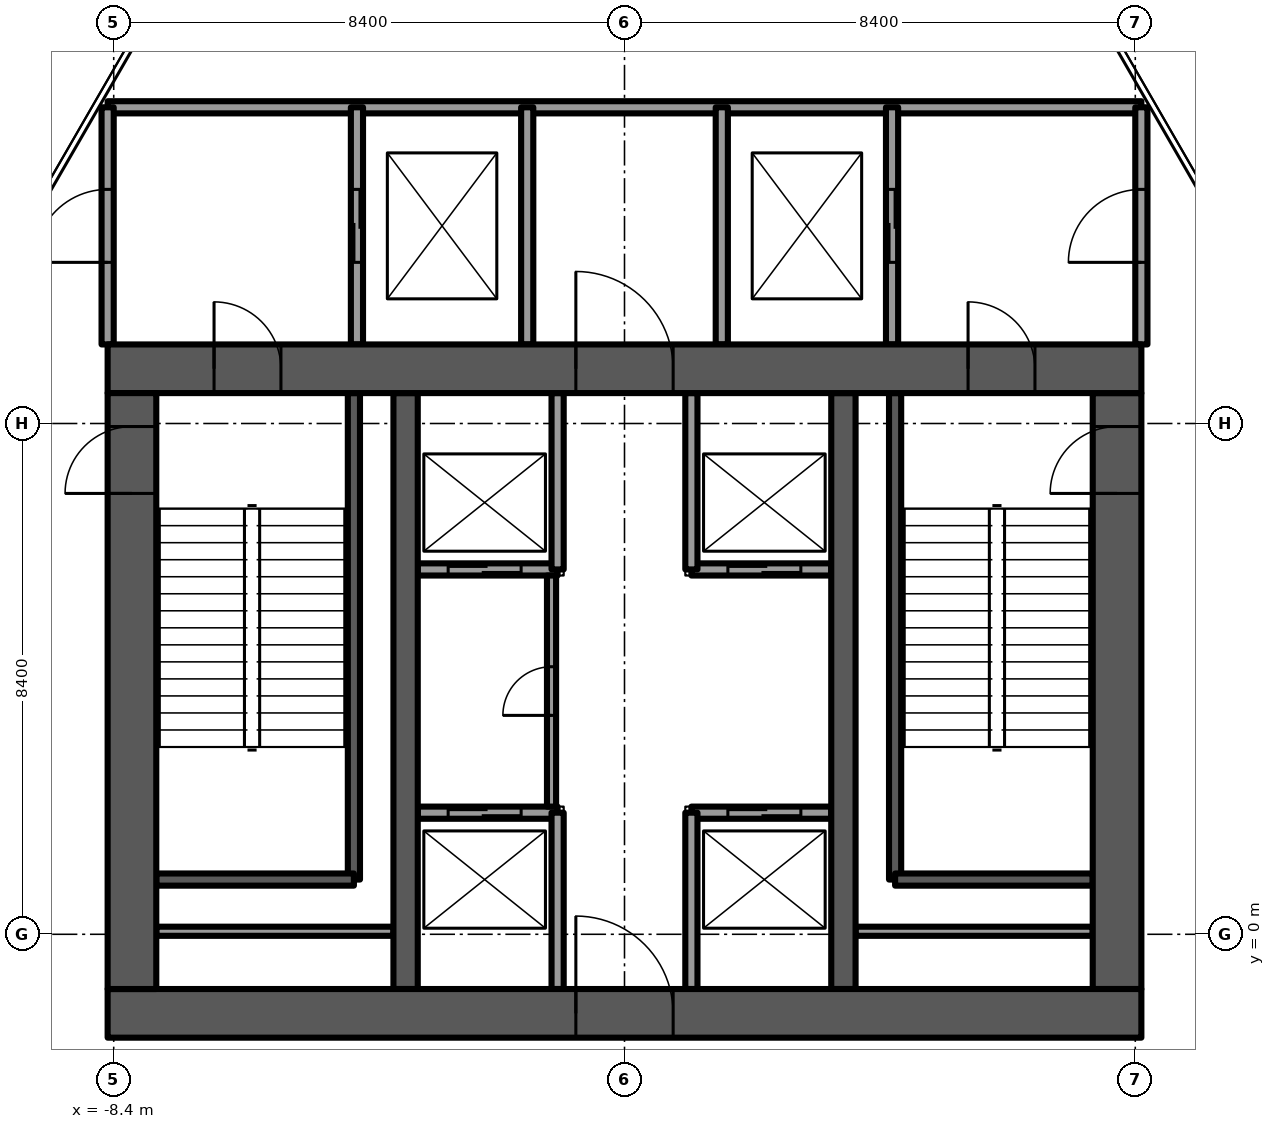
"""IFC4 building model, lengths in metres.
Left out: names, types, materials, properties, quantities, classifications, styles, units other than length and angle.
Written with IfcOpenShell. Run it as: python <this file> out.ifc"""

import sys

from ifc_helpers import new_model, si_unit, direction, frame, frame_2d, origin, place, context, subcontext, project, spatial, rectangle, extrude, element, fill, save


model = new_model("IFC4")
c1 = context("Model", 3, precision=1e-05, world=origin(), true_north=direction((0.0, 1.0)))
c2 = subcontext(c1, "Body", "Model", "MODEL_VIEW")
j1 = project(units=[si_unit("LENGTHUNIT", "METRE"), si_unit("PLANEANGLEUNIT", "RADIAN")], contexts=[c1])
p1 = place(None, origin())
s1 = spatial("IfcSite", under=j1, at=p1, CompositionType="ELEMENT")
p2 = place(p1, origin())
s2 = spatial("IfcBuilding", under=s1, at=p2, CompositionType="ELEMENT")
p3 = place(p2, frame((0.0, 0.0, 209.5)))
s3 = spatial("IfcBuildingStorey", under=s2, at=p3, CompositionType="ELEMENT", Elevation=209.5)
p4 = place(p3, frame((-8.5, -1.3, -0.3), z_axis=(0.0, 0.0, 1.0), x_axis=(1.0, 0.0, 0.0)))
e1 = element("IfcWall", 1, at=p4, inside=s3, PredefinedType="SHEAR", context=c2, shape_type="SweptSolid", body=[
    extrude(rectangle(XDim=17.0, YDim=0.8, at=frame_2d((8.5, 0.0))), origin(), (0.0, 0.0, 1.0), 5.0),
])
p5 = place(p4, frame((7.7, 0.0, 0.0)))
e2 = element("IfcOpeningElement", 2, at=p5, cuts=e1, PredefinedType="OPENING", context=c2, shape_type="SweptSolid", body=[
    extrude(rectangle(XDim=1.6, YDim=2.1, at=frame_2d((0.8, 1.05))), frame((0.0, 0.4, 0.0), z_axis=(0.0, -1.0, 0.0), x_axis=(1.0, 0.0, 0.0)), (0.0, 0.0, 1.0), 0.8),
])
p6 = place(p3, frame((-8.5, 9.3, -0.3), z_axis=(0.0, 0.0, 1.0), x_axis=(1.0, 0.0, 0.0)))
e3 = element("IfcWall", 3, at=p6, inside=s3, PredefinedType="SHEAR", context=c2, shape_type="SweptSolid", body=[
    extrude(rectangle(XDim=17.0, YDim=0.8, at=frame_2d((8.5, 0.0))), origin(), (0.0, 0.0, 1.0), 5.0),
])
p7 = place(p6, frame((7.7, 0.0, 0.0)))
e4 = element("IfcOpeningElement", 4, at=p7, cuts=e3, PredefinedType="OPENING", context=c2, shape_type="SweptSolid", body=[
    extrude(rectangle(XDim=1.6, YDim=2.1, at=frame_2d((0.8, 1.05))), frame((0.0, 0.4, 0.0), z_axis=(0.0, -1.0, 0.0), x_axis=(1.0, 0.0, 0.0)), (0.0, 0.0, 1.0), 0.8),
])
p8 = place(p6, frame((1.75, 0.0, 0.0)))
e5 = element("IfcOpeningElement", 5, at=p8, cuts=e3, PredefinedType="OPENING", context=c2, shape_type="SweptSolid", body=[
    extrude(rectangle(XDim=1.1, YDim=2.1, at=frame_2d((0.55, 1.05))), frame((0.0, 0.4, 0.0), z_axis=(0.0, -1.0, 0.0), x_axis=(1.0, 0.0, 0.0)), (0.0, 0.0, 1.0), 0.8),
])
p9 = place(p6, frame((14.15, 0.0, 0.0)))
e6 = element("IfcOpeningElement", 6, at=p9, cuts=e3, PredefinedType="OPENING", context=c2, shape_type="SweptSolid", body=[
    extrude(rectangle(XDim=1.1, YDim=2.1, at=frame_2d((0.55, 1.05))), frame((0.0, 0.4, 0.0), z_axis=(0.0, -1.0, 0.0), x_axis=(1.0, 0.0, 0.0)), (0.0, 0.0, 1.0), 0.8),
])
p10 = place(p3, frame((-8.1, -0.9, -0.3), z_axis=(0.0, 0.0, 1.0), x_axis=(0.0, 1.0, 0.0)))
e7 = element("IfcWall", 7, at=p10, inside=s3, PredefinedType="SHEAR", context=c2, shape_type="SweptSolid", body=[
    extrude(rectangle(XDim=9.8, YDim=0.8, at=frame_2d((4.9, 0.0))), origin(), (0.0, 0.0, 1.0), 5.0),
])
p11 = place(p10, frame((8.15, 0.0, 0.0)))
e8 = element("IfcOpeningElement", 8, at=p11, cuts=e7, PredefinedType="OPENING", context=c2, shape_type="SweptSolid", body=[
    extrude(rectangle(XDim=1.1, YDim=2.1, at=frame_2d((0.55, 1.05))), frame((0.0, 0.4, 0.0), z_axis=(0.0, -1.0, 0.0), x_axis=(1.0, 0.0, 0.0)), (0.0, 0.0, 1.0), 0.8),
])
p12 = place(p3, frame((8.1, -0.9, -0.3), z_axis=(0.0, 0.0, 1.0), x_axis=(0.0, 1.0, 0.0)))
e9 = element("IfcWall", 9, at=p12, inside=s3, PredefinedType="SHEAR", context=c2, shape_type="SweptSolid", body=[
    extrude(rectangle(XDim=9.8, YDim=0.8, at=frame_2d((4.9, 0.0))), origin(), (0.0, 0.0, 1.0), 5.0),
])
p13 = place(p12, frame((8.15, 0.0, 0.0)))
e10 = element("IfcOpeningElement", 10, at=p13, cuts=e9, PredefinedType="OPENING", context=c2, shape_type="SweptSolid", body=[
    extrude(rectangle(XDim=1.1, YDim=2.1, at=frame_2d((0.55, 1.05))), frame((0.0, 0.4, 0.0), z_axis=(0.0, -1.0, 0.0), x_axis=(1.0, 0.0, 0.0)), (0.0, 0.0, 1.0), 0.8),
])
for number, where, z_axis, x_axis in (
    (11, (-3.6, -0.9, -0.3), (0.0, 0.0, 1.0), (0.0, 1.0, 0.0)),
    (12, (3.6, -0.9, -0.3), (0.0, 0.0, 1.0), (0.0, 1.0, 0.0)),
):
    element("IfcWall", number, at=place(p3, frame(where, z_axis=z_axis, x_axis=x_axis)), inside=s3, PredefinedType="SHEAR", context=c2, shape_type="SweptSolid", body=[
        extrude(rectangle(XDim=9.8, YDim=0.4, at=frame_2d((4.9, 0.0))), origin(), (0.0, 0.0, 1.0), 5.0),
    ])
p14 = place(p3, frame((-3.4, 2.0, 0.0), z_axis=(0.0, 0.0, 1.0), x_axis=(1.0, 0.0, 0.0)))
e13 = element("IfcWall", 13, at=p14, inside=s3, PredefinedType="PARTITIONING", context=c2, shape_type="SweptSolid", body=[
    extrude(rectangle(XDim=2.3, YDim=0.2, at=frame_2d((1.15, 0.0))), origin(), (0.0, 0.0, 1.0), 4.7),
])
p15 = place(p14, frame((0.5, 0.0, 0.0)))
e14 = element("IfcOpeningElement", 14, at=p15, cuts=e13, PredefinedType="OPENING", context=c2, shape_type="SweptSolid", body=[
    extrude(rectangle(XDim=1.2, YDim=2.1, at=frame_2d((0.6, 1.05))), frame((0.0, 0.1, 0.0), z_axis=(0.0, -1.0, 0.0), x_axis=(1.0, 0.0, 0.0)), (0.0, 0.0, 1.0), 0.2),
])
p16 = place(p3, frame((-3.4, 6.0, 0.0), z_axis=(0.0, 0.0, 1.0), x_axis=(1.0, 0.0, 0.0)))
e15 = element("IfcWall", 15, at=p16, inside=s3, PredefinedType="PARTITIONING", context=c2, shape_type="SweptSolid", body=[
    extrude(rectangle(XDim=2.3, YDim=0.2, at=frame_2d((1.15, 0.0))), origin(), (0.0, 0.0, 1.0), 4.7),
])
p17 = place(p16, frame((0.5, 0.0, 0.0)))
e16 = element("IfcOpeningElement", 16, at=p17, cuts=e15, PredefinedType="OPENING", context=c2, shape_type="SweptSolid", body=[
    extrude(rectangle(XDim=1.2, YDim=2.1, at=frame_2d((0.6, 1.05))), frame((0.0, 0.1, 0.0), z_axis=(0.0, -1.0, 0.0), x_axis=(1.0, 0.0, 0.0)), (0.0, 0.0, 1.0), 0.2),
])
p18 = place(p3, frame((1.1, 2.0, 0.0), z_axis=(0.0, 0.0, 1.0), x_axis=(1.0, 0.0, 0.0)))
e17 = element("IfcWall", 17, at=p18, inside=s3, PredefinedType="PARTITIONING", context=c2, shape_type="SweptSolid", body=[
    extrude(rectangle(XDim=2.3, YDim=0.2, at=frame_2d((1.15, 0.0))), origin(), (0.0, 0.0, 1.0), 4.7),
])
p19 = place(p18, frame((0.6, 0.0, 0.0)))
e18 = element("IfcOpeningElement", 18, at=p19, cuts=e17, PredefinedType="OPENING", context=c2, shape_type="SweptSolid", body=[
    extrude(rectangle(XDim=1.2, YDim=2.1, at=frame_2d((0.6, 1.05))), frame((0.0, 0.1, 0.0), z_axis=(0.0, -1.0, 0.0), x_axis=(1.0, 0.0, 0.0)), (0.0, 0.0, 1.0), 0.2),
])
p20 = place(p3, frame((1.1, 6.0, 0.0), z_axis=(0.0, 0.0, 1.0), x_axis=(1.0, 0.0, 0.0)))
e19 = element("IfcWall", 19, at=p20, inside=s3, PredefinedType="PARTITIONING", context=c2, shape_type="SweptSolid", body=[
    extrude(rectangle(XDim=2.3, YDim=0.2, at=frame_2d((1.15, 0.0))), origin(), (0.0, 0.0, 1.0), 4.7),
])
p21 = place(p20, frame((0.6, 0.0, 0.0)))
e20 = element("IfcOpeningElement", 20, at=p21, cuts=e19, PredefinedType="OPENING", context=c2, shape_type="SweptSolid", body=[
    extrude(rectangle(XDim=1.2, YDim=2.1, at=frame_2d((0.6, 1.05))), frame((0.0, 0.1, 0.0), z_axis=(0.0, -1.0, 0.0), x_axis=(1.0, 0.0, 0.0)), (0.0, 0.0, 1.0), 0.2),
])
for number, where, z_axis, x_axis in (
    (21, (-1.1, -0.9, 0.0), (0.0, 0.0, 1.0), (0.0, 1.0, 0.0)),
    (22, (1.1, -0.9, 0.0), (0.0, 0.0, 1.0), (0.0, 1.0, 0.0)),
    (23, (-1.1, 6.0, 0.0), (0.0, 0.0, 1.0), (0.0, 1.0, 0.0)),
    (24, (1.1, 6.0, 0.0), (0.0, 0.0, 1.0), (0.0, 1.0, 0.0)),
):
    element("IfcWall", number, at=place(p3, frame(where, z_axis=z_axis, x_axis=x_axis)), inside=s3, PredefinedType="PARTITIONING", context=c2, shape_type="SweptSolid", body=[
        extrude(rectangle(XDim=2.9, YDim=0.2, at=frame_2d((1.45, 0.0))), origin(), (0.0, 0.0, 1.0), 4.7),
    ])
p22 = place(p3, frame((-4.45, 0.9, -0.3), z_axis=(0.0, 0.0, 1.0), x_axis=(0.0, 1.0, 0.0)))
e25 = element("IfcWall", 25, at=p22, inside=s3, PredefinedType="SOLIDWALL", context=c2, shape_type="SweptSolid", body=[
    extrude(rectangle(XDim=8.0, YDim=0.2, at=frame_2d((4.0, 0.0))), origin(), (0.0, 0.0, 1.0), 5.0),
])
p23 = place(p3, frame((-7.7, 0.9, -0.3), z_axis=(0.0, 0.0, 1.0), x_axis=(1.0, 0.0, 0.0)))
e26 = element("IfcWall", 26, at=p23, inside=s3, PredefinedType="SOLIDWALL", context=c2, shape_type="SweptSolid", body=[
    extrude(rectangle(XDim=3.25, YDim=0.2, at=frame_2d((1.625, 0.0))), origin(), (0.0, 0.0, 1.0), 5.0),
])
p24 = place(p3, frame((-7.7, 0.05, 0.0), z_axis=(0.0, 0.0, 1.0), x_axis=(1.0, 0.0, 0.0)))
e27 = element("IfcWall", 27, at=p24, inside=s3, PredefinedType="PARTITIONING", context=c2, shape_type="SweptSolid", body=[
    extrude(rectangle(XDim=3.9, YDim=0.15, at=frame_2d((1.95, 0.0))), origin(), (0.0, 0.0, 1.0), 4.7),
])
p25 = place(p3, frame((4.45, 0.9, -0.3), z_axis=(0.0, 0.0, 1.0), x_axis=(0.0, 1.0, 0.0)))
e28 = element("IfcWall", 28, at=p25, inside=s3, PredefinedType="SOLIDWALL", context=c2, shape_type="SweptSolid", body=[
    extrude(rectangle(XDim=8.0, YDim=0.2, at=frame_2d((4.0, 0.0))), origin(), (0.0, 0.0, 1.0), 5.0),
])
p26 = place(p3, frame((4.45, 0.9, -0.3), z_axis=(0.0, 0.0, 1.0), x_axis=(1.0, 0.0, 0.0)))
e29 = element("IfcWall", 29, at=p26, inside=s3, PredefinedType="SOLIDWALL", context=c2, shape_type="SweptSolid", body=[
    extrude(rectangle(XDim=3.25, YDim=0.2, at=frame_2d((1.625, 0.0))), origin(), (0.0, 0.0, 1.0), 5.0),
])
p27 = place(p3, frame((3.8, 0.05, 0.0), z_axis=(0.0, 0.0, 1.0), x_axis=(1.0, 0.0, 0.0)))
e30 = element("IfcWall", 30, at=p27, inside=s3, PredefinedType="PARTITIONING", context=c2, shape_type="SweptSolid", body=[
    extrude(rectangle(XDim=3.9, YDim=0.15, at=frame_2d((1.95, 0.0))), origin(), (0.0, 0.0, 1.0), 4.7),
])
p28 = place(p3, frame((-8.5, 13.6, 0.0), z_axis=(0.0, 0.0, 1.0), x_axis=(1.0, 0.0, 0.0)))
e31 = element("IfcWall", 31, at=p28, inside=s3, PredefinedType="PARTITIONING", context=c2, shape_type="SweptSolid", body=[
    extrude(rectangle(XDim=17.0, YDim=0.2, at=frame_2d((8.5, 0.0))), origin(), (0.0, 0.0, 1.0), 4.7),
])
p29 = place(p3, frame((-8.5, 9.7, 0.0), z_axis=(0.0, 0.0, 1.0), x_axis=(0.0, 1.0, 0.0)))
e32 = element("IfcWall", 32, at=p29, inside=s3, PredefinedType="PARTITIONING", context=c2, shape_type="SweptSolid", body=[
    extrude(rectangle(XDim=3.9, YDim=0.2, at=frame_2d((1.95, 0.0))), origin(), (0.0, 0.0, 1.0), 4.7),
])
p30 = place(p29, frame((1.35, 0.0, 0.0)))
e33 = element("IfcOpeningElement", 33, at=p30, cuts=e32, PredefinedType="OPENING", context=c2, shape_type="SweptSolid", body=[
    extrude(rectangle(XDim=1.2, YDim=2.1, at=frame_2d((0.6, 1.05))), frame((0.0, 0.1, 0.0), z_axis=(0.0, -1.0, 0.0), x_axis=(1.0, 0.0, 0.0)), (0.0, 0.0, 1.0), 0.2),
])
p31 = place(p3, frame((8.5, 9.7, 0.0), z_axis=(0.0, 0.0, 1.0), x_axis=(0.0, 1.0, 0.0)))
e34 = element("IfcWall", 34, at=p31, inside=s3, PredefinedType="PARTITIONING", context=c2, shape_type="SweptSolid", body=[
    extrude(rectangle(XDim=3.9, YDim=0.2, at=frame_2d((1.95, 0.0))), origin(), (0.0, 0.0, 1.0), 4.7),
])
p32 = place(p31, frame((1.35, 0.0, 0.0)))
e35 = element("IfcOpeningElement", 35, at=p32, cuts=e34, PredefinedType="OPENING", context=c2, shape_type="SweptSolid", body=[
    extrude(rectangle(XDim=1.2, YDim=2.1, at=frame_2d((0.6, 1.05))), frame((0.0, 0.1, 0.0), z_axis=(0.0, -1.0, 0.0), x_axis=(1.0, 0.0, 0.0)), (0.0, 0.0, 1.0), 0.2),
])
p33 = place(p3, frame((-4.4, 9.7, 0.0), z_axis=(0.0, 0.0, 1.0), x_axis=(0.0, 1.0, 0.0)))
e36 = element("IfcWall", 36, at=p33, inside=s3, PredefinedType="PARTITIONING", context=c2, shape_type="SweptSolid", body=[
    extrude(rectangle(XDim=3.9, YDim=0.2, at=frame_2d((1.95, 0.0))), origin(), (0.0, 0.0, 1.0), 4.7),
])
p34 = place(p33, frame((1.35, 0.0, 0.0)))
e37 = element("IfcOpeningElement", 37, at=p34, cuts=e36, PredefinedType="OPENING", context=c2, shape_type="SweptSolid", body=[
    extrude(rectangle(XDim=1.2, YDim=2.1, at=frame_2d((0.6, 1.05))), frame((0.0, 0.1, 0.0), z_axis=(0.0, -1.0, 0.0), x_axis=(1.0, 0.0, 0.0)), (0.0, 0.0, 1.0), 0.2),
])
p35 = place(p3, frame((4.4, 9.7, 0.0), z_axis=(0.0, 0.0, 1.0), x_axis=(0.0, 1.0, 0.0)))
e38 = element("IfcWall", 38, at=p35, inside=s3, PredefinedType="PARTITIONING", context=c2, shape_type="SweptSolid", body=[
    extrude(rectangle(XDim=3.9, YDim=0.2, at=frame_2d((1.95, 0.0))), origin(), (0.0, 0.0, 1.0), 4.7),
])
p36 = place(p35, frame((1.35, 0.0, 0.0)))
e39 = element("IfcOpeningElement", 39, at=p36, cuts=e38, PredefinedType="OPENING", context=c2, shape_type="SweptSolid", body=[
    extrude(rectangle(XDim=1.2, YDim=2.1, at=frame_2d((0.6, 1.05))), frame((0.0, 0.1, 0.0), z_axis=(0.0, -1.0, 0.0), x_axis=(1.0, 0.0, 0.0)), (0.0, 0.0, 1.0), 0.2),
])
for number, where, z_axis, x_axis in (
    (40, (-1.6, 9.7, 0.0), (0.0, 0.0, 1.0), (0.0, 1.0, 0.0)),
    (41, (1.6, 9.7, 0.0), (0.0, 0.0, 1.0), (0.0, 1.0, 0.0)),
):
    element("IfcWall", number, at=place(p3, frame(where, z_axis=z_axis, x_axis=x_axis)), inside=s3, PredefinedType="PARTITIONING", context=c2, shape_type="SweptSolid", body=[
        extrude(rectangle(XDim=3.9, YDim=0.2, at=frame_2d((1.95, 0.0))), origin(), (0.0, 0.0, 1.0), 4.7),
    ])
p37 = place(p3, frame((-1.2, 2.1, 0.0), z_axis=(0.0, 0.0, 1.0), x_axis=(0.0, 1.0, 0.0)))
e42 = element("IfcWall", 42, at=p37, inside=s3, PredefinedType="PARTITIONING", context=c2, shape_type="SweptSolid", body=[
    extrude(rectangle(XDim=3.8, YDim=0.15, at=frame_2d((1.9, 0.0))), origin(), (0.0, 0.0, 1.0), 4.7),
])
p38 = place(p37, frame((1.5, 0.0, 0.0)))
e43 = element("IfcOpeningElement", 43, at=p38, cuts=e42, PredefinedType="OPENING", context=c2, shape_type="SweptSolid", body=[
    extrude(rectangle(XDim=0.8, YDim=2.1, at=frame_2d((0.4, 1.05))), frame((0.0, 0.075, 0.0), z_axis=(0.0, -1.0, 0.0), x_axis=(1.0, 0.0, 0.0)), (0.0, 0.0, 1.0), 0.15),
])
p39 = place(p15, origin())
e44 = element("IfcDoor", 44, at=p39, inside=s3, OperationType="SLIDING_TO_LEFT", PredefinedType="DOOR", context=c2, shape_type="SweptSolid", body=[
    extrude(rectangle(XDim=1.2, YDim=2.1, at=frame_2d((0.6, 1.05))), frame((0.0, 0.025, 0.0), z_axis=(0.0, -1.0, 0.0), x_axis=(1.0, 0.0, 0.0)), (0.0, 0.0, 1.0), 0.05),
])
fill(e14, e44)
p40 = place(p19, origin())
e45 = element("IfcDoor", 45, at=p40, inside=s3, OperationType="SLIDING_TO_LEFT", PredefinedType="DOOR", context=c2, shape_type="SweptSolid", body=[
    extrude(rectangle(XDim=1.2, YDim=2.1, at=frame_2d((0.6, 1.05))), frame((0.0, 0.025, 0.0), z_axis=(0.0, -1.0, 0.0), x_axis=(1.0, 0.0, 0.0)), (0.0, 0.0, 1.0), 0.05),
])
fill(e18, e45)
p41 = place(p17, origin())
e46 = element("IfcDoor", 46, at=p41, inside=s3, OperationType="SLIDING_TO_LEFT", PredefinedType="DOOR", context=c2, shape_type="SweptSolid", body=[
    extrude(rectangle(XDim=1.2, YDim=2.1, at=frame_2d((0.6, 1.05))), frame((0.0, 0.025, 0.0), z_axis=(0.0, -1.0, 0.0), x_axis=(1.0, 0.0, 0.0)), (0.0, 0.0, 1.0), 0.05),
])
fill(e16, e46)
p42 = place(p21, origin())
e47 = element("IfcDoor", 47, at=p42, inside=s3, OperationType="SLIDING_TO_LEFT", PredefinedType="DOOR", context=c2, shape_type="SweptSolid", body=[
    extrude(rectangle(XDim=1.2, YDim=2.1, at=frame_2d((0.6, 1.05))), frame((0.0, 0.025, 0.0), z_axis=(0.0, -1.0, 0.0), x_axis=(1.0, 0.0, 0.0)), (0.0, 0.0, 1.0), 0.05),
])
fill(e20, e47)
p43 = place(p5, origin())
e48 = element("IfcDoor", 48, at=p43, inside=s3, OperationType="DOUBLE_DOOR_SINGLE_SWING", PredefinedType="DOOR", context=c2, shape_type="SweptSolid", body=[
    extrude(rectangle(XDim=1.6, YDim=2.1, at=frame_2d((0.8, 1.05))), frame((0.0, 0.025, 0.0), z_axis=(0.0, -1.0, 0.0), x_axis=(1.0, 0.0, 0.0)), (0.0, 0.0, 1.0), 0.05),
])
fill(e2, e48)
p44 = place(p7, origin())
e49 = element("IfcDoor", 49, at=p44, inside=s3, OperationType="DOUBLE_DOOR_SINGLE_SWING", PredefinedType="DOOR", context=c2, shape_type="SweptSolid", body=[
    extrude(rectangle(XDim=1.6, YDim=2.1, at=frame_2d((0.8, 1.05))), frame((0.0, 0.025, 0.0), z_axis=(0.0, -1.0, 0.0), x_axis=(1.0, 0.0, 0.0)), (0.0, 0.0, 1.0), 0.05),
])
fill(e4, e49)
p45 = place(p8, origin())
e50 = element("IfcDoor", 50, at=p45, inside=s3, OperationType="SINGLE_SWING_LEFT", PredefinedType="DOOR", context=c2, shape_type="SweptSolid", body=[
    extrude(rectangle(XDim=1.1, YDim=2.1, at=frame_2d((0.55, 1.05))), frame((0.0, 0.025, 0.0), z_axis=(0.0, -1.0, 0.0), x_axis=(1.0, 0.0, 0.0)), (0.0, 0.0, 1.0), 0.05),
])
fill(e5, e50)
p46 = place(p11, origin())
e51 = element("IfcDoor", 51, at=p46, inside=s3, OperationType="SINGLE_SWING_RIGHT", PredefinedType="DOOR", context=c2, shape_type="SweptSolid", body=[
    extrude(rectangle(XDim=1.1, YDim=2.1, at=frame_2d((0.55, 1.05))), frame((0.0, 0.025, 0.0), z_axis=(0.0, -1.0, 0.0), x_axis=(1.0, 0.0, 0.0)), (0.0, 0.0, 1.0), 0.05),
])
fill(e8, e51)
p47 = place(p9, origin())
e52 = element("IfcDoor", 52, at=p47, inside=s3, OperationType="SINGLE_SWING_RIGHT", PredefinedType="DOOR", context=c2, shape_type="SweptSolid", body=[
    extrude(rectangle(XDim=1.1, YDim=2.1, at=frame_2d((0.55, 1.05))), frame((0.0, 0.025, 0.0), z_axis=(0.0, -1.0, 0.0), x_axis=(1.0, 0.0, 0.0)), (0.0, 0.0, 1.0), 0.05),
])
fill(e6, e52)
p48 = place(p13, origin())
e53 = element("IfcDoor", 53, at=p48, inside=s3, OperationType="SINGLE_SWING_LEFT", PredefinedType="DOOR", context=c2, shape_type="SweptSolid", body=[
    extrude(rectangle(XDim=1.1, YDim=2.1, at=frame_2d((0.55, 1.05))), frame((0.0, 0.025, 0.0), z_axis=(0.0, -1.0, 0.0), x_axis=(1.0, 0.0, 0.0)), (0.0, 0.0, 1.0), 0.05),
])
fill(e10, e53)
p49 = place(p34, origin())
e54 = element("IfcDoor", 54, at=p49, inside=s3, OperationType="SLIDING_TO_LEFT", PredefinedType="DOOR", context=c2, shape_type="SweptSolid", body=[
    extrude(rectangle(XDim=1.2, YDim=2.1, at=frame_2d((0.6, 1.05))), frame((0.0, 0.025, 0.0), z_axis=(0.0, -1.0, 0.0), x_axis=(1.0, 0.0, 0.0)), (0.0, 0.0, 1.0), 0.05),
])
fill(e37, e54)
p50 = place(p30, origin())
e55 = element("IfcDoor", 55, at=p50, inside=s3, OperationType="SINGLE_SWING_LEFT", PredefinedType="DOOR", context=c2, shape_type="SweptSolid", body=[
    extrude(rectangle(XDim=1.2, YDim=2.1, at=frame_2d((0.6, 1.05))), frame((0.0, 0.025, 0.0), z_axis=(0.0, -1.0, 0.0), x_axis=(1.0, 0.0, 0.0)), (0.0, 0.0, 1.0), 0.05),
])
fill(e33, e55)
p51 = place(p36, origin())
e56 = element("IfcDoor", 56, at=p51, inside=s3, OperationType="SLIDING_TO_LEFT", PredefinedType="DOOR", context=c2, shape_type="SweptSolid", body=[
    extrude(rectangle(XDim=1.2, YDim=2.1, at=frame_2d((0.6, 1.05))), frame((0.0, 0.025, 0.0), z_axis=(0.0, -1.0, 0.0), x_axis=(1.0, 0.0, 0.0)), (0.0, 0.0, 1.0), 0.05),
])
fill(e39, e56)
p52 = place(p32, origin())
e57 = element("IfcDoor", 57, at=p52, inside=s3, OperationType="SINGLE_SWING_LEFT", PredefinedType="DOOR", context=c2, shape_type="SweptSolid", body=[
    extrude(rectangle(XDim=1.2, YDim=2.1, at=frame_2d((0.6, 1.05))), frame((0.0, 0.025, 0.0), z_axis=(0.0, -1.0, 0.0), x_axis=(1.0, 0.0, 0.0)), (0.0, 0.0, 1.0), 0.05),
])
fill(e35, e57)
p53 = place(p38, origin())
e58 = element("IfcDoor", 58, at=p53, inside=s3, OperationType="SINGLE_SWING_LEFT", PredefinedType="DOOR", context=c2, shape_type="SweptSolid", body=[
    extrude(rectangle(XDim=0.8, YDim=2.1, at=frame_2d((0.4, 1.05))), frame((0.0, 0.025, 0.0), z_axis=(0.0, -1.0, 0.0), x_axis=(1.0, 0.0, 0.0)), (0.0, 0.0, 1.0), 0.05),
])
fill(e43, e58)
save(model, sys.argv[1])
